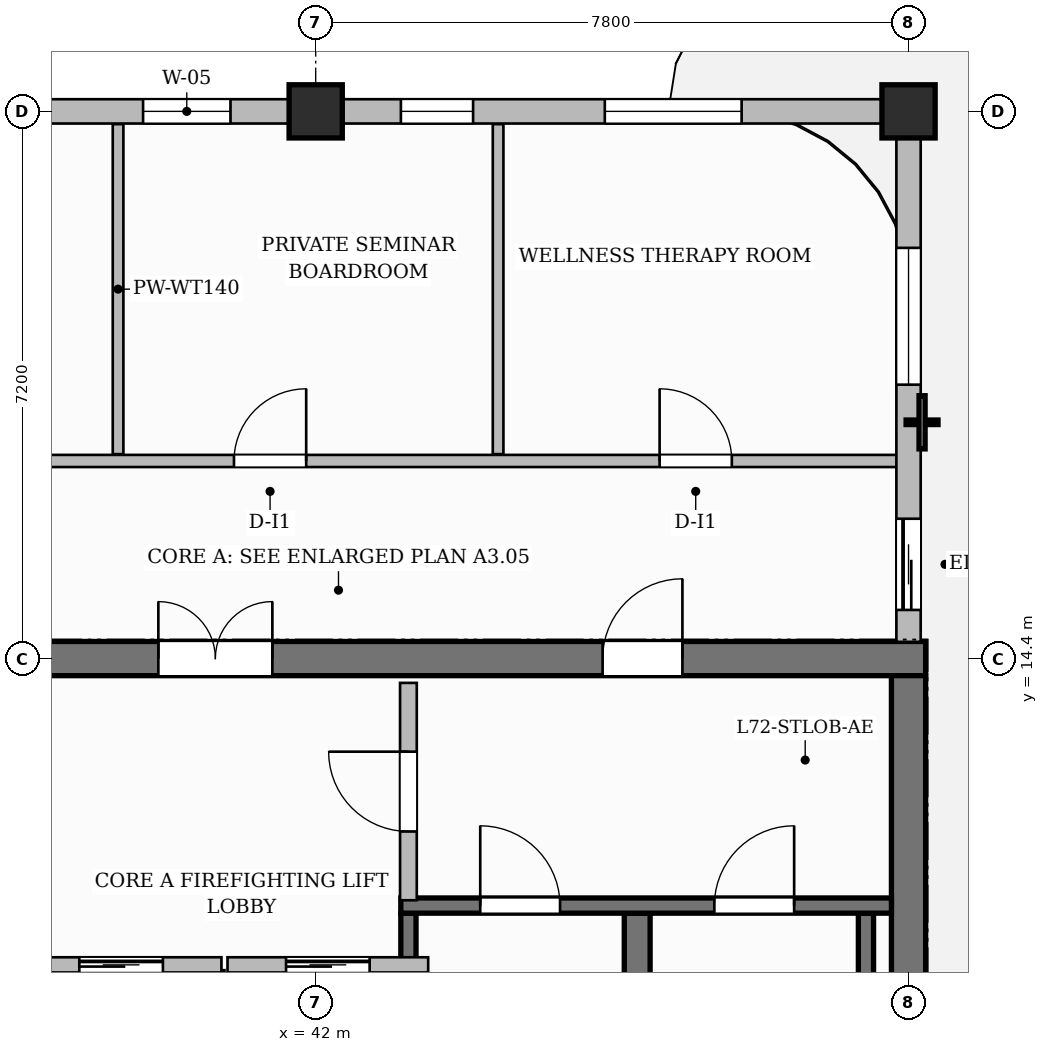
"""IFC4 building model, lengths in metres.
Left out: names, types, materials, properties, quantities, classifications, styles, units other than length and angle.
Written with IfcOpenShell. Run it as: python <this file> out.ifc"""

import sys

from ifc_helpers import new_model, si_unit, direction, frame, frame_2d, origin, origin_2d, place, context, subcontext, project, spatial, rectangle, extrude, source, transform, mapped, element, fill, save


model = new_model("IFC4")
c1 = context("Model", 3, precision=1e-05, world=origin(), true_north=direction((0.0, 1.0)))
c2 = subcontext(c1, "Body", "Model", "MODEL_VIEW")
j1 = project(units=[si_unit("LENGTHUNIT", "METRE"), si_unit("PLANEANGLEUNIT", "RADIAN")], contexts=[c1])
p1 = place(None, origin())
s1 = spatial("IfcSite", under=j1, at=p1, CompositionType="ELEMENT")
p2 = place(p1, origin())
s2 = spatial("IfcBuilding", under=s1, at=p2, CompositionType="ELEMENT")
p3 = place(p2, frame((0.0, 0.0, 286.6)))
s3 = spatial("IfcBuildingStorey", under=s2, at=p3, CompositionType="ELEMENT", Elevation=286.6)
p4 = place(p3, frame((34.575, 14.4, 0.0), z_axis=(0.0, 0.0, 1.0), x_axis=(1.0, 0.0, 0.0)))
e1 = element("IfcWall", 1, at=p4, inside=s3, PredefinedType="SHEAR", context=c2, shape_type="SweptSolid", body=[
    extrude(rectangle(XDim=15.45, YDim=0.45, at=frame_2d((7.725, 0.0))), origin(), (0.0, 0.0, 1.0), 3.85),
])
p5 = place(p4, frame((5.355, 0.0, 0.0)))
e2 = element("IfcOpeningElement", 2, at=p5, cuts=e1, PredefinedType="OPENING", context=c2, shape_type="SweptSolid", body=[
    extrude(rectangle(XDim=1.5, YDim=2.2, at=frame_2d((0.75, 1.1))), frame((0.0, 0.235, 0.0), z_axis=(0.0, -1.0, 0.0), x_axis=(1.0, 0.0, 0.0)), (0.0, 0.0, 1.0), 0.47),
])
p6 = place(p4, frame((1.57, 0.0, 0.0)))
e3 = element("IfcOpeningElement", 3, at=p6, cuts=e1, PredefinedType="OPENING", context=c2, shape_type="SweptSolid", body=[
    extrude(rectangle(XDim=1.05, YDim=2.15, at=frame_2d((0.525, 1.075))), frame((0.0, 0.235, 0.0), z_axis=(0.0, -1.0, 0.0), x_axis=(1.0, 0.0, 0.0)), (0.0, 0.0, 1.0), 0.47),
])
p7 = place(p4, frame((11.2, 0.0, 0.0)))
e4 = element("IfcOpeningElement", 4, at=p7, cuts=e1, PredefinedType="OPENING", context=c2, shape_type="SweptSolid", body=[
    extrude(rectangle(XDim=1.05, YDim=2.15, at=frame_2d((0.525, 1.075))), frame((0.0, 0.235, 0.0), z_axis=(0.0, -1.0, 0.0), x_axis=(1.0, 0.0, 0.0)), (0.0, 0.0, 1.0), 0.47),
])
p8 = place(p3, frame((49.8, 3.825, 0.0), z_axis=(0.0, 0.0, 1.0), x_axis=(0.0, 1.0, 0.0)))
e5 = element("IfcWall", 5, at=p8, inside=s3, PredefinedType="SHEAR", context=c2, shape_type="SweptSolid", body=[
    extrude(rectangle(XDim=10.35, YDim=0.45, at=frame_2d((5.175, 0.0))), origin(), (0.0, 0.0, 1.0), 3.85),
])
m1 = source(origin(), c2, "Body", "SweptSolid", [
    extrude(rectangle(XDim=0.7, YDim=0.7, at=origin_2d()), origin(), (0.0, 0.0, 1.0), 3.85),
])
for number, where, z_axis, x_axis in (
    (6, (42.0, 21.6, 0.0), (0.0, 0.0, 1.0), (1.0, 0.0, 0.0)),
    (7, (49.8, 21.6, 0.0), (0.0, 0.0, 1.0), (1.0, 0.0, 0.0)),
):
    element("IfcColumn", number, at=place(p3, frame(where, z_axis=z_axis, x_axis=x_axis)), inside=s3, PredefinedType="COLUMN", context=c2, shape_type="MappedRepresentation", body=[
        mapped(m1, transform((0.0, 0.0, 0.0), scale=1.0)),
    ])
p9 = place(p3, frame((43.22, 4.1, 0.0), z_axis=(0.0, 0.0, 1.0), x_axis=(0.0, 1.0, 0.0)))
e8 = element("IfcWall", 8, at=p9, inside=s3, PredefinedType="SHEAR", context=c2, shape_type="SweptSolid", body=[
    extrude(rectangle(XDim=6.95, YDim=0.2, at=frame_2d((3.475, 0.0))), origin(), (0.0, 0.0, 1.0), 3.85),
])
p10 = place(p3, frame((46.23, 4.1, 0.0), z_axis=(0.0, 0.0, 1.0), x_axis=(0.0, 1.0, 0.0)))
e9 = element("IfcWall", 9, at=p10, inside=s3, PredefinedType="SHEAR", context=c2, shape_type="SweptSolid", body=[
    extrude(rectangle(XDim=6.95, YDim=0.34, at=frame_2d((3.475, 0.0))), origin(), (0.0, 0.0, 1.0), 3.85),
])
p11 = place(p3, frame((49.24, 4.1, 0.0), z_axis=(0.0, 0.0, 1.0), x_axis=(0.0, 1.0, 0.0)))
e10 = element("IfcWall", 10, at=p11, inside=s3, PredefinedType="SHEAR", context=c2, shape_type="SweptSolid", body=[
    extrude(rectangle(XDim=6.95, YDim=0.2, at=frame_2d((3.475, 0.0))), origin(), (0.0, 0.0, 1.0), 3.85),
])
p12 = place(p3, frame((43.12, 11.15, 0.0), z_axis=(0.0, 0.0, 1.0), x_axis=(1.0, 0.0, 0.0)))
e11 = element("IfcWall", 11, at=p12, inside=s3, PredefinedType="SHEAR", context=c2, shape_type="SweptSolid", body=[
    extrude(rectangle(XDim=6.455, YDim=0.2, at=frame_2d((3.228, 0.0))), origin(), (0.0, 0.0, 1.0), 3.85),
])
p13 = place(p12, frame((1.045, 0.0, 0.0)))
e12 = element("IfcOpeningElement", 12, at=p13, cuts=e11, PredefinedType="OPENING", context=c2, shape_type="SweptSolid", body=[
    extrude(rectangle(XDim=1.05, YDim=2.2, at=frame_2d((0.525, 1.1))), frame((0.0, 0.11, 0.0), z_axis=(0.0, -1.0, 0.0), x_axis=(1.0, 0.0, 0.0)), (0.0, 0.0, 1.0), 0.22),
])
p14 = place(p12, frame((4.125, 0.0, 0.0)))
e13 = element("IfcOpeningElement", 13, at=p14, cuts=e11, PredefinedType="OPENING", context=c2, shape_type="SweptSolid", body=[
    extrude(rectangle(XDim=1.05, YDim=2.2, at=frame_2d((0.525, 1.1))), frame((0.0, 0.11, 0.0), z_axis=(0.0, -1.0, 0.0), x_axis=(1.0, 0.0, 0.0)), (0.0, 0.0, 1.0), 0.22),
])
p15 = place(p3, frame((40.7, 8.12, 0.0), z_axis=(0.0, 0.0, 1.0), x_axis=(0.0, 1.0, 0.0)))
e14 = element("IfcWall", 14, at=p15, inside=s3, PredefinedType="PARTITIONING", context=c2, shape_type="SweptSolid", body=[
    extrude(rectangle(XDim=2.18, YDim=0.2, at=frame_2d((1.09, 0.0))), origin(), (0.0, 0.0, 1.0), 3.6),
])
p16 = place(p3, frame((43.22, 11.22, 0.0), z_axis=(0.0, 0.0, 1.0), x_axis=(0.0, 1.0, 0.0)))
e15 = element("IfcWall", 15, at=p16, inside=s3, PredefinedType="PARTITIONING", context=c2, shape_type="SweptSolid", body=[
    extrude(rectangle(XDim=2.86, YDim=0.22, at=frame_2d((1.43, 0.0))), origin(), (0.0, 0.0, 1.0), 3.6),
])
p17 = place(p16, frame((0.905, 0.0, 0.0)))
e16 = element("IfcOpeningElement", 16, at=p17, cuts=e15, PredefinedType="OPENING", context=c2, shape_type="SweptSolid", body=[
    extrude(rectangle(XDim=1.05, YDim=2.15, at=frame_2d((0.525, 1.075))), frame((0.0, 0.12, 0.0), z_axis=(0.0, -1.0, 0.0), x_axis=(1.0, 0.0, 0.0)), (0.0, 0.0, 1.0), 0.24),
])
p18 = place(p3, frame((30.29, 17.0, 0.0), z_axis=(0.0, 0.0, 1.0), x_axis=(1.0, 0.0, 0.0)))
e17 = element("IfcWall", 17, at=p18, inside=s3, PredefinedType="PARTITIONING", context=c2, shape_type="SweptSolid", body=[
    extrude(rectangle(XDim=19.37, YDim=0.16, at=frame_2d((9.685, 0.0))), origin(), (0.0, 0.0, 1.0), 3.6),
])
p19 = place(p18, frame((1.135, 0.0, 0.0)))
e18 = element("IfcOpeningElement", 18, at=p19, cuts=e17, PredefinedType="OPENING", context=c2, shape_type="SweptSolid", body=[
    extrude(rectangle(XDim=0.85, YDim=2.1, at=frame_2d((0.425, 1.05))), frame((0.0, 0.09, 0.0), z_axis=(0.0, -1.0, 0.0), x_axis=(1.0, 0.0, 0.0)), (0.0, 0.0, 1.0), 0.18),
])
p20 = place(p18, frame((5.71, 0.0, 0.0)))
e19 = element("IfcOpeningElement", 19, at=p20, cuts=e17, PredefinedType="OPENING", context=c2, shape_type="SweptSolid", body=[
    extrude(rectangle(XDim=0.9, YDim=2.15, at=frame_2d((0.45, 1.075))), frame((0.0, 0.09, 0.0), z_axis=(0.0, -1.0, 0.0), x_axis=(1.0, 0.0, 0.0)), (0.0, 0.0, 1.0), 0.18),
])
p21 = place(p18, frame((10.635, 0.0, 0.0)))
e20 = element("IfcOpeningElement", 20, at=p21, cuts=e17, PredefinedType="OPENING", context=c2, shape_type="SweptSolid", body=[
    extrude(rectangle(XDim=0.95, YDim=2.15, at=frame_2d((0.475, 1.075))), frame((0.0, 0.09, 0.0), z_axis=(0.0, -1.0, 0.0), x_axis=(1.0, 0.0, 0.0)), (0.0, 0.0, 1.0), 0.18),
])
p22 = place(p18, frame((16.235, 0.0, 0.0)))
e21 = element("IfcOpeningElement", 21, at=p22, cuts=e17, PredefinedType="OPENING", context=c2, shape_type="SweptSolid", body=[
    extrude(rectangle(XDim=0.95, YDim=2.15, at=frame_2d((0.475, 1.075))), frame((0.0, 0.09, 0.0), z_axis=(0.0, -1.0, 0.0), x_axis=(1.0, 0.0, 0.0)), (0.0, 0.0, 1.0), 0.18),
])
for number, where, z_axis, x_axis in (
    (22, (39.4, 17.09, 0.0), (0.0, 0.0, 1.0), (0.0, 1.0, 0.0)),
    (23, (44.4, 17.09, 0.0), (0.0, 0.0, 1.0), (0.0, 1.0, 0.0)),
):
    element("IfcWall", number, at=place(p3, frame(where, z_axis=z_axis, x_axis=x_axis)), inside=s3, PredefinedType="PARTITIONING", context=c2, shape_type="SweptSolid", body=[
        extrude(rectangle(XDim=4.342, YDim=0.14, at=frame_2d((2.171, 0.0))), origin(), (0.0, 0.0, 1.0), 3.6),
    ])
p23 = place(p3, frame((38.12, 10.37, 0.0), z_axis=(0.0, 0.0, 1.0), x_axis=(1.0, 0.0, 0.0)))
e24 = element("IfcWall", 24, at=p23, inside=s3, PredefinedType="PARTITIONING", context=c2, shape_type="SweptSolid", body=[
    extrude(rectangle(XDim=2.64, YDim=0.2, at=frame_2d((1.32, 0.0))), origin(), (0.0, 0.0, 1.0), 3.6),
])
p24 = place(p23, frame((0.77, 0.0, 0.0)))
e25 = element("IfcOpeningElement", 25, at=p24, cuts=e24, PredefinedType="OPENING", context=c2, shape_type="SweptSolid", body=[
    extrude(rectangle(XDim=1.1, YDim=2.2, at=frame_2d((0.55, 1.1))), frame((0.0, 0.11, 0.0), z_axis=(0.0, -1.0, 0.0), x_axis=(1.0, 0.0, 0.0)), (0.0, 0.0, 1.0), 0.22),
])
p25 = place(p3, frame((40.84, 10.37, 0.0), z_axis=(0.0, 0.0, 1.0), x_axis=(1.0, 0.0, 0.0)))
e26 = element("IfcWall", 26, at=p25, inside=s3, PredefinedType="PARTITIONING", context=c2, shape_type="SweptSolid", body=[
    extrude(rectangle(XDim=2.64, YDim=0.2, at=frame_2d((1.32, 0.0))), origin(), (0.0, 0.0, 1.0), 3.6),
])
p26 = place(p25, frame((0.77, 0.0, 0.0)))
e27 = element("IfcOpeningElement", 27, at=p26, cuts=e26, PredefinedType="OPENING", context=c2, shape_type="SweptSolid", body=[
    extrude(rectangle(XDim=1.1, YDim=2.2, at=frame_2d((0.55, 1.1))), frame((0.0, 0.11, 0.0), z_axis=(0.0, -1.0, 0.0), x_axis=(1.0, 0.0, 0.0)), (0.0, 0.0, 1.0), 0.22),
])
p27 = place(p3, frame((49.8, 14.62, 0.0), z_axis=(0.0, 0.0, 1.0), x_axis=(0.0, 1.0, 0.0)))
e28 = element("IfcWall", 28, at=p27, inside=s3, PredefinedType="SOLIDWALL", context=c2, shape_type="SweptSolid", body=[
    extrude(rectangle(XDim=6.93, YDim=0.32, at=frame_2d((3.465, 0.0))), origin(), (0.0, 0.0, 1.0), 3.185),
])
p28 = place(p27, frame((0.42, 0.0, 0.0)))
e29 = element("IfcOpeningElement", 29, at=p28, cuts=e28, PredefinedType="OPENING", context=c2, shape_type="SweptSolid", body=[
    extrude(rectangle(XDim=1.2, YDim=2.2, at=frame_2d((0.6, 1.1))), frame((0.0, 0.17, 0.0), z_axis=(0.0, -1.0, 0.0), x_axis=(1.0, 0.0, 0.0)), (0.0, 0.0, 1.0), 0.34),
])
p29 = place(p27, frame((3.384, 0.0, 0.8)))
e30 = element("IfcOpeningElement", 30, at=p29, cuts=e28, PredefinedType="OPENING", context=c2, shape_type="SweptSolid", body=[
    extrude(rectangle(XDim=1.8, YDim=1.85, at=frame_2d((0.9, 0.925))), frame((0.0, 0.17, 0.0), z_axis=(0.0, -1.0, 0.0), x_axis=(1.0, 0.0, 0.0)), (0.0, 0.0, 1.0), 0.34),
])
p30 = place(p3, frame((18.0, 21.6, 0.0), z_axis=(0.0, 0.0, 1.0), x_axis=(1.0, 0.0, 0.0)))
e31 = element("IfcWall", 31, at=p30, inside=s3, PredefinedType="SOLIDWALL", context=c2, shape_type="SweptSolid", body=[
    extrude(rectangle(XDim=31.8, YDim=0.32, at=frame_2d((15.9, 0.0))), origin(), (0.0, 0.0, 1.0), 3.185),
])
p31 = place(p30, frame((0.42, 0.0, 0.0)))
e32 = element("IfcOpeningElement", 32, at=p31, cuts=e31, PredefinedType="OPENING", context=c2, shape_type="SweptSolid", body=[
    extrude(rectangle(XDim=1.2, YDim=2.2, at=frame_2d((0.6, 1.1))), frame((0.0, 0.17, 0.0), z_axis=(0.0, -1.0, 0.0), x_axis=(1.0, 0.0, 0.0)), (0.0, 0.0, 1.0), 0.34),
])
p32 = place(p30, frame((4.581, 0.0, 0.8)))
e33 = element("IfcOpeningElement", 33, at=p32, cuts=e31, PredefinedType="OPENING", context=c2, shape_type="SweptSolid", body=[
    extrude(rectangle(XDim=0.95, YDim=1.75, at=frame_2d((0.475, 0.875))), frame((0.0, 0.17, 0.0), z_axis=(0.0, -1.0, 0.0), x_axis=(1.0, 0.0, 0.0)), (0.0, 0.0, 1.0), 0.34),
])
p33 = place(p30, frame((6.964, 0.0, 0.8)))
e34 = element("IfcOpeningElement", 34, at=p33, cuts=e31, PredefinedType="OPENING", context=c2, shape_type="SweptSolid", body=[
    extrude(rectangle(XDim=1.8, YDim=1.85, at=frame_2d((0.9, 0.925))), frame((0.0, 0.17, 0.0), z_axis=(0.0, -1.0, 0.0), x_axis=(1.0, 0.0, 0.0)), (0.0, 0.0, 1.0), 0.34),
])
p34 = place(p30, frame((12.95, 0.0, 0.8)))
e35 = element("IfcOpeningElement", 35, at=p34, cuts=e31, PredefinedType="OPENING", context=c2, shape_type="SweptSolid", body=[
    extrude(rectangle(XDim=1.8, YDim=1.85, at=frame_2d((0.9, 0.925))), frame((0.0, 0.17, 0.0), z_axis=(0.0, -1.0, 0.0), x_axis=(1.0, 0.0, 0.0)), (0.0, 0.0, 1.0), 0.34),
])
p35 = place(p30, frame((18.596, 0.0, 0.8)))
e36 = element("IfcOpeningElement", 36, at=p35, cuts=e31, PredefinedType="OPENING", context=c2, shape_type="SweptSolid", body=[
    extrude(rectangle(XDim=1.8, YDim=1.85, at=frame_2d((0.9, 0.925))), frame((0.0, 0.17, 0.0), z_axis=(0.0, -1.0, 0.0), x_axis=(1.0, 0.0, 0.0)), (0.0, 0.0, 1.0), 0.34),
])
p36 = place(p30, frame((21.729, 0.0, 0.8)))
e37 = element("IfcOpeningElement", 37, at=p36, cuts=e31, PredefinedType="OPENING", context=c2, shape_type="SweptSolid", body=[
    extrude(rectangle(XDim=1.15, YDim=1.8, at=frame_2d((0.575, 0.9))), frame((0.0, 0.17, 0.0), z_axis=(0.0, -1.0, 0.0), x_axis=(1.0, 0.0, 0.0)), (0.0, 0.0, 1.0), 0.34),
])
p37 = place(p30, frame((25.121, 0.0, 0.8)))
e38 = element("IfcOpeningElement", 38, at=p37, cuts=e31, PredefinedType="OPENING", context=c2, shape_type="SweptSolid", body=[
    extrude(rectangle(XDim=0.95, YDim=1.75, at=frame_2d((0.475, 0.875))), frame((0.0, 0.17, 0.0), z_axis=(0.0, -1.0, 0.0), x_axis=(1.0, 0.0, 0.0)), (0.0, 0.0, 1.0), 0.34),
])
p38 = place(p30, frame((27.804, 0.0, 0.8)))
e39 = element("IfcOpeningElement", 39, at=p38, cuts=e31, PredefinedType="OPENING", context=c2, shape_type="SweptSolid", body=[
    extrude(rectangle(XDim=1.8, YDim=1.85, at=frame_2d((0.9, 0.925))), frame((0.0, 0.17, 0.0), z_axis=(0.0, -1.0, 0.0), x_axis=(1.0, 0.0, 0.0)), (0.0, 0.0, 1.0), 0.34),
])
m2 = source(origin(), c2, "Body", "SweptSolid", [
    extrude(rectangle(XDim=1.05, YDim=2.2, at=frame_2d((0.525, 1.1))), frame((0.0, 0.025, 0.0), z_axis=(0.0, -1.0, 0.0), x_axis=(1.0, 0.0, 0.0)), (0.0, 0.0, 1.0), 0.05),
])
p39 = place(p13, origin())
e40 = element("IfcDoor", 40, at=p39, inside=s3, OperationType="SINGLE_SWING_LEFT", PredefinedType="DOOR", context=c2, shape_type="MappedRepresentation", body=[
    mapped(m2, transform((0.0, 0.0, 0.0), scale=1.0)),
])
fill(e12, e40)
p40 = place(p14, origin())
e41 = element("IfcDoor", 41, at=p40, inside=s3, OperationType="SINGLE_SWING_RIGHT", PredefinedType="DOOR", context=c2, shape_type="MappedRepresentation", body=[
    mapped(m2, transform((0.0, 0.0, 0.0), scale=1.0)),
])
fill(e13, e41)
m3 = source(origin(), c2, "Body", "SweptSolid", [
    extrude(rectangle(XDim=1.05, YDim=2.15, at=frame_2d((0.525, 1.075))), frame((0.0, 0.025, 0.0), z_axis=(0.0, -1.0, 0.0), x_axis=(1.0, 0.0, 0.0)), (0.0, 0.0, 1.0), 0.05),
])
p41 = place(p17, origin())
e42 = element("IfcDoor", 42, at=p41, inside=s3, OperationType="SINGLE_SWING_RIGHT", PredefinedType="DOOR", context=c2, shape_type="MappedRepresentation", body=[
    mapped(m3, transform((0.0, 0.0, 0.0), scale=1.0)),
])
fill(e16, e42)
m4 = source(origin(), c2, "Body", "SweptSolid", [
    extrude(rectangle(XDim=1.5, YDim=2.2, at=frame_2d((0.75, 1.1))), frame((0.0, 0.025, 0.0), z_axis=(0.0, -1.0, 0.0), x_axis=(1.0, 0.0, 0.0)), (0.0, 0.0, 1.0), 0.05),
])
p42 = place(p5, origin())
e43 = element("IfcDoor", 43, at=p42, inside=s3, OperationType="DOUBLE_DOOR_SINGLE_SWING", PredefinedType="DOOR", context=c2, shape_type="MappedRepresentation", body=[
    mapped(m4, transform((0.0, 0.0, 0.0), scale=1.0)),
])
fill(e2, e43)
p43 = place(p7, origin())
e44 = element("IfcDoor", 44, at=p43, inside=s3, OperationType="SINGLE_SWING_RIGHT", PredefinedType="DOOR", context=c2, shape_type="MappedRepresentation", body=[
    mapped(m3, transform((0.0, 0.0, 0.0), scale=1.0)),
])
fill(e4, e44)
m5 = source(origin(), c2, "Body", "SweptSolid", [
    extrude(rectangle(XDim=0.95, YDim=2.15, at=frame_2d((0.475, 1.075))), frame((0.0, 0.025, 0.0), z_axis=(0.0, -1.0, 0.0), x_axis=(1.0, 0.0, 0.0)), (0.0, 0.0, 1.0), 0.05),
])
p44 = place(p21, origin())
e45 = element("IfcDoor", 45, at=p44, inside=s3, OperationType="SINGLE_SWING_RIGHT", PredefinedType="DOOR", context=c2, shape_type="MappedRepresentation", body=[
    mapped(m5, transform((0.0, 0.0, 0.0), scale=1.0)),
])
fill(e20, e45)
p45 = place(p22, origin())
e46 = element("IfcDoor", 46, at=p45, inside=s3, OperationType="SINGLE_SWING_LEFT", PredefinedType="DOOR", context=c2, shape_type="MappedRepresentation", body=[
    mapped(m5, transform((0.0, 0.0, 0.0), scale=1.0)),
])
fill(e21, e46)
m6 = source(origin(), c2, "Body", "SweptSolid", [
    extrude(rectangle(XDim=1.1, YDim=2.2, at=frame_2d((0.55, 1.1))), frame((0.0, 0.025, 0.0), z_axis=(0.0, -1.0, 0.0), x_axis=(1.0, 0.0, 0.0)), (0.0, 0.0, 1.0), 0.05),
])
p46 = place(p24, origin())
e47 = element("IfcDoor", 47, at=p46, inside=s3, OperationType="SLIDING_TO_LEFT", PredefinedType="DOOR", context=c2, shape_type="MappedRepresentation", body=[
    mapped(m6, transform((0.0, 0.0, 0.0), scale=1.0)),
])
fill(e25, e47)
p47 = place(p26, origin())
e48 = element("IfcDoor", 48, at=p47, inside=s3, OperationType="SLIDING_TO_LEFT", PredefinedType="DOOR", context=c2, shape_type="MappedRepresentation", body=[
    mapped(m6, transform((0.0, 0.0, 0.0), scale=1.0)),
])
fill(e27, e48)
m7 = source(origin(), c2, "Body", "SweptSolid", [
    extrude(rectangle(XDim=1.2, YDim=2.2, at=frame_2d((0.6, 1.1))), frame((0.0, 0.025, 0.0), z_axis=(0.0, -1.0, 0.0), x_axis=(1.0, 0.0, 0.0)), (0.0, 0.0, 1.0), 0.05),
])
p48 = place(p28, origin())
e49 = element("IfcDoor", 49, at=p48, inside=s3, OperationType="SLIDING_TO_LEFT", PredefinedType="DOOR", context=c2, shape_type="MappedRepresentation", body=[
    mapped(m7, transform((0.0, 0.0, 0.0), scale=1.0)),
])
fill(e29, e49)
m8 = source(origin(), c2, "Body", "SweptSolid", [
    extrude(rectangle(XDim=1.8, YDim=1.85, at=frame_2d((0.9, 0.925))), frame((0.0, 0.03, 0.0), z_axis=(0.0, -1.0, 0.0), x_axis=(1.0, 0.0, 0.0)), (0.0, 0.0, 1.0), 0.06),
])
p49 = place(p29, origin())
e50 = element("IfcWindow", 50, at=p49, inside=s3, PartitioningType="DOUBLE_PANEL_VERTICAL", PredefinedType="WINDOW", context=c2, shape_type="MappedRepresentation", body=[
    mapped(m8, transform((0.0, 0.0, 0.0), scale=1.0)),
])
fill(e30, e50)
m9 = source(origin(), c2, "Body", "SweptSolid", [
    extrude(rectangle(XDim=1.15, YDim=1.8, at=frame_2d((0.575, 0.9))), frame((0.0, 0.03, 0.0), z_axis=(0.0, -1.0, 0.0), x_axis=(1.0, 0.0, 0.0)), (0.0, 0.0, 1.0), 0.06),
])
p50 = place(p36, origin())
e51 = element("IfcWindow", 51, at=p50, inside=s3, PartitioningType="SINGLE_PANEL", PredefinedType="WINDOW", context=c2, shape_type="MappedRepresentation", body=[
    mapped(m9, transform((0.0, 0.0, 0.0), scale=1.0)),
])
fill(e37, e51)
m10 = source(origin(), c2, "Body", "SweptSolid", [
    extrude(rectangle(XDim=0.95, YDim=1.75, at=frame_2d((0.475, 0.875))), frame((0.0, 0.03, 0.0), z_axis=(0.0, -1.0, 0.0), x_axis=(1.0, 0.0, 0.0)), (0.0, 0.0, 1.0), 0.06),
])
p51 = place(p37, origin())
e52 = element("IfcWindow", 52, at=p51, inside=s3, PartitioningType="SINGLE_PANEL", PredefinedType="WINDOW", context=c2, shape_type="MappedRepresentation", body=[
    mapped(m10, transform((0.0, 0.0, 0.0), scale=1.0)),
])
fill(e38, e52)
p52 = place(p38, origin())
e53 = element("IfcWindow", 53, at=p52, inside=s3, PartitioningType="DOUBLE_PANEL_VERTICAL", PredefinedType="WINDOW", context=c2, shape_type="MappedRepresentation", body=[
    mapped(m8, transform((0.0, 0.0, 0.0), scale=1.0)),
])
fill(e39, e53)
save(model, sys.argv[1])
